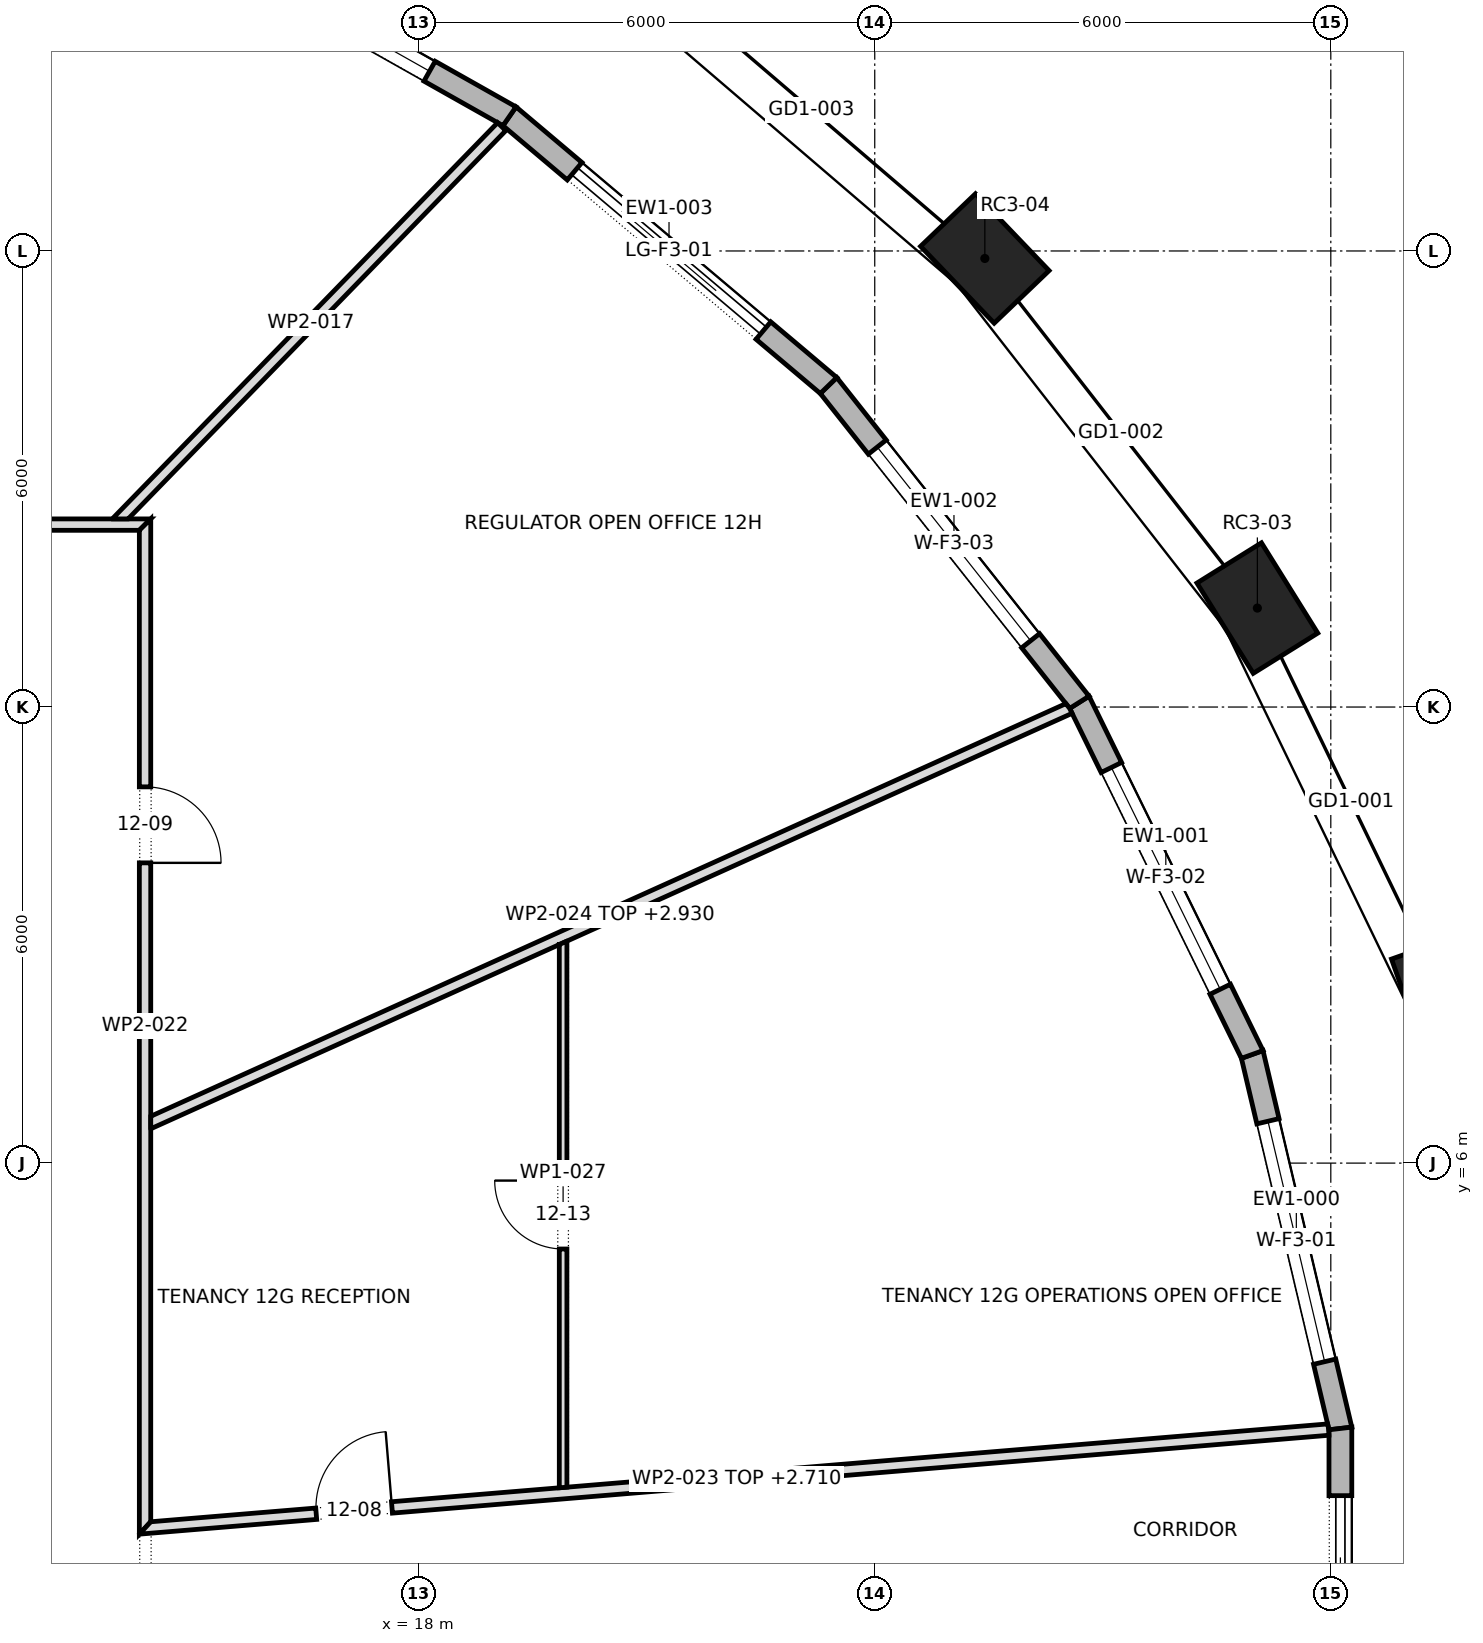
"""IFC4 building model, lengths in metres.
Left out: names, types, materials, properties, quantities, classifications, styles, units other than length and angle.
Written with IfcOpenShell. Run it as: python <this file> out.ifc"""

import sys

from ifc_helpers import new_model, si_unit, direction, frame, frame_2d, origin, origin_2d, place, context, subcontext, project, spatial, polyline, rectangle, outline, extrude, element, fill, save


model = new_model("IFC4")
c1 = context("Model", 3, precision=1e-05, world=origin(), true_north=direction((0.0, 1.0)))
c2 = subcontext(c1, "Body", "Model", "MODEL_VIEW")
j1 = project(units=[si_unit("LENGTHUNIT", "METRE"), si_unit("PLANEANGLEUNIT", "RADIAN")], contexts=[c1])
p1 = place(None, origin())
s1 = spatial("IfcSite", under=j1, at=p1, CompositionType="ELEMENT")
p2 = place(p1, origin())
s2 = spatial("IfcBuilding", under=s1, at=p2, CompositionType="ELEMENT")
p3 = place(p2, frame((0.0, 0.0, 178.9)))
s3 = spatial("IfcBuildingStorey", under=s2, at=p3, CompositionType="ELEMENT", Elevation=178.9)
for number, where, z_axis, x_axis in (
    (1, (31.503, 8.191, 0.0), (0.0, 0.0, 1.0), (-0.334, 0.943, 0.0)),
    (2, (29.034, 13.302, 0.0), (0.0, 0.0, 1.0), (-0.529, 0.849, 0.0)),
    (3, (25.448, 17.901, 0.0), (0.0, 0.0, 1.0), (-0.692, 0.722, 0.0)),
):
    element("IfcColumn", number, at=place(p3, frame(where, z_axis=z_axis, x_axis=x_axis)), inside=s3, PredefinedType="COLUMN", context=c2, shape_type="SweptSolid", body=[
        extrude(rectangle(XDim=1.4, YDim=1.0, at=origin_2d()), origin(), (0.0, 0.0, 1.0), 4.0),
    ])
p4 = place(p3, frame((30.126, 2.509, 0.0), z_axis=(0.0, 0.0, 1.0), x_axis=(-0.229434992017, 0.973323987395, 0.0)))
e4 = element("IfcWall", 4, at=p4, inside=s3, PredefinedType="STANDARD", context=c2, shape_type="SweptSolid", body=[
    extrude(outline(polyline([(-0.017, -0.15), (5.072, -0.15), (5.039, 0.15), (0.017, 0.15), (-0.017, -0.15)])), origin(), (0.0, 0.0, 1.0), 3.7),
])
p5 = place(p4, frame((0.903, 0.0, 0.6)))
e5 = element("IfcOpeningElement", 5, at=p5, cuts=e4, PredefinedType="OPENING", context=c2, shape_type="SweptSolid", body=[
    extrude(rectangle(XDim=3.25, YDim=2.65, at=frame_2d((1.625, 1.325))), frame((0.0, 0.162, 0.0), z_axis=(0.0, -1.0, 0.0), x_axis=(1.0, 0.0, 0.0)), (0.0, 0.0, 1.0), 0.324),
])
p6 = place(p3, frame((28.966, 7.429, 0.0), z_axis=(0.0, 0.0, 1.0), x_axis=(-0.440673883676, 0.897667270343, 0.0)))
e6 = element("IfcWall", 6, at=p6, inside=s3, PredefinedType="STANDARD", context=c2, shape_type="SweptSolid", body=[
    extrude(outline(polyline([(-0.017, -0.15), (5.177, -0.15), (5.145, 0.15), (0.017, 0.15), (-0.017, -0.15)])), origin(), (0.0, 0.0, 1.0), 3.7),
])
p7 = place(p6, frame((0.956, 0.0, 0.6)))
e7 = element("IfcOpeningElement", 7, at=p7, cuts=e6, PredefinedType="OPENING", context=c2, shape_type="SweptSolid", body=[
    extrude(rectangle(XDim=3.25, YDim=2.65, at=frame_2d((1.625, 1.325))), frame((0.0, 0.162, 0.0), z_axis=(0.0, -1.0, 0.0), x_axis=(1.0, 0.0, 0.0)), (0.0, 0.0, 1.0), 0.324),
])
p8 = place(p3, frame((26.692, 12.062, 0.0), z_axis=(0.0, 0.0, 1.0), x_axis=(-0.620766467446, 0.78399553117, 0.0)))
e8 = element("IfcWall", 8, at=p8, inside=s3, PredefinedType="STANDARD", context=c2, shape_type="SweptSolid", body=[
    extrude(outline(polyline([(-0.016, -0.15), (5.331, -0.15), (5.301, 0.15), (0.016, 0.15), (-0.016, -0.15)])), origin(), (0.0, 0.0, 1.0), 3.7),
])
p9 = place(p8, frame((1.033, 0.0, 0.6)))
e9 = element("IfcOpeningElement", 9, at=p9, cuts=e8, PredefinedType="OPENING", context=c2, shape_type="SweptSolid", body=[
    extrude(rectangle(XDim=3.25, YDim=2.65, at=frame_2d((1.625, 1.325))), frame((0.0, 0.162, 0.0), z_axis=(0.0, -1.0, 0.0), x_axis=(1.0, 0.0, 0.0)), (0.0, 0.0, 1.0), 0.324),
])
p10 = place(p3, frame((23.392, 16.23, 0.0), z_axis=(0.0, 0.0, 1.0), x_axis=(-0.764238764041, 0.64493341636, 0.0)))
e10 = element("IfcWall", 10, at=p10, inside=s3, PredefinedType="STANDARD", context=c2, shape_type="SweptSolid", body=[
    extrude(outline(polyline([(-0.015, -0.15), (5.507, -0.15), (5.478, 0.15), (0.015, 0.15), (-0.015, -0.15)])), origin(), (0.0, 0.0, 1.0), 3.7),
])
p11 = place(p10, frame((1.121, 0.0, 0.0)))
e11 = element("IfcOpeningElement", 11, at=p11, cuts=e10, PredefinedType="OPENING", context=c2, shape_type="SweptSolid", body=[
    extrude(rectangle(XDim=3.25, YDim=3.25, at=frame_2d((1.625, 1.625))), frame((0.0, 0.162, 0.0), z_axis=(0.0, -1.0, 0.0), x_axis=(1.0, 0.0, 0.0)), (0.0, 0.0, 1.0), 0.324),
])
p12 = place(p3, frame((19.195, 19.772, 0.0), z_axis=(0.0, 0.0, 1.0), x_axis=(-0.871077775545, 0.491145099691, 0.0)))
e12 = element("IfcWall", 12, at=p12, inside=s3, PredefinedType="STANDARD", context=c2, shape_type="SweptSolid", body=[
    extrude(outline(polyline([(-0.014, -0.15), (5.677, -0.15), (5.65, 0.15), (0.014, 0.15), (-0.014, -0.15)])), origin(), (0.0, 0.0, 1.0), 3.7),
])
p13 = place(p12, frame((1.207, 0.0, 0.6)))
e13 = element("IfcOpeningElement", 13, at=p13, cuts=e12, PredefinedType="OPENING", context=c2, shape_type="SweptSolid", body=[
    extrude(rectangle(XDim=3.25, YDim=2.65, at=frame_2d((1.625, 1.325))), frame((0.0, 0.162, 0.0), z_axis=(0.0, -1.0, 0.0), x_axis=(1.0, 0.0, 0.0)), (0.0, 0.0, 1.0), 0.324),
])
p14 = place(p3, frame((30.126, -2.509, 0.0), z_axis=(0.0, 0.0, 1.0), x_axis=(0.0, 1.0, 0.0)))
e14 = element("IfcWall", 14, at=p14, inside=s3, PredefinedType="STANDARD", context=c2, shape_type="SweptSolid", body=[
    extrude(outline(polyline([(-0.017, -0.15), (5.035, -0.15), (5.0, 0.15), (0.017, 0.15), (-0.017, -0.15)])), origin(), (0.0, 0.0, 1.0), 3.7),
])
p15 = place(p14, frame((0.884, 0.0, 0.0)))
e15 = element("IfcOpeningElement", 15, at=p15, cuts=e14, PredefinedType="OPENING", context=c2, shape_type="SweptSolid", body=[
    extrude(rectangle(XDim=3.25, YDim=3.25, at=frame_2d((1.625, 1.625))), frame((0.0, 0.162, 0.0), z_axis=(0.0, -1.0, 0.0), x_axis=(1.0, 0.0, 0.0)), (0.0, 0.0, 1.0), 0.324),
])
p16 = place(p3, frame((1.596, 14.4, 0.0), z_axis=(0.0, 0.0, 1.0), x_axis=(1.0, 0.0, 0.0)))
e16 = element("IfcWall", 16, at=p16, inside=s3, PredefinedType="PARTITIONING", context=c2, shape_type="SweptSolid", body=[
    extrude(outline(polyline([(0.0, -0.075), (1.818, -0.075), (3.637, -0.075), (5.455, -0.075), (7.274, -0.075), (9.092, -0.075), (10.911, -0.075), (12.729, -0.075), (12.879, 0.075), (11.063, 0.075), (9.248, 0.075), (7.432, 0.075), (5.616, 0.075), (3.8, 0.075), (1.984, 0.075), (0.168, 0.075), (0.0, -0.075), (0.0, -0.075)])), origin(), (0.0, 0.0, 1.0), 3.7),
])
p17 = place(p16, frame((5.744, 0.0, 0.0)))
e17 = element("IfcOpeningElement", 17, at=p17, cuts=e16, PredefinedType="OPENING", context=c2, shape_type="SweptSolid", body=[
    extrude(rectangle(XDim=1.0, YDim=2.1, at=frame_2d((0.5, 1.05))), frame((0.0, 0.087, 0.0), z_axis=(0.0, -1.0, 0.0), x_axis=(1.0, 0.0, 0.0)), (0.0, 0.0, 1.0), 0.174),
])
p18 = place(p3, frame((14.022, 14.423, 0.0), z_axis=(0.0, 0.0, 1.0), x_axis=(0.69721790069, 0.716859260216, 0.0)))
e18 = element("IfcWall", 18, at=p18, inside=s3, PredefinedType="PARTITIONING", context=c2, shape_type="SweptSolid", body=[
    extrude(outline(polyline([(0.0, 0.075), (0.0, 0.075), (0.146, -0.075), (1.927, -0.075), (3.708, -0.075), (5.49, -0.075), (7.271, -0.075), (7.271, 0.075), (5.454, 0.075), (3.636, 0.075), (1.818, 0.075), (0.0, 0.075)])), origin(), (0.0, 0.0, 1.0), 3.7),
])
p19 = place(p3, frame((14.4, 1.118, 0.0), z_axis=(0.0, 0.0, 1.0), x_axis=(0.0, 1.0, 0.0)))
e19 = element("IfcWall", 19, at=p19, inside=s3, PredefinedType="PARTITIONING", context=c2, shape_type="SweptSolid", body=[
    extrude(outline(polyline([(0.163, -0.075), (2.048, -0.075), (3.933, -0.075), (5.817, -0.075), (7.702, -0.075), (9.587, -0.075), (11.472, -0.075), (13.356, -0.075), (13.207, 0.075), (11.32, 0.075), (9.433, 0.075), (7.547, 0.075), (5.66, 0.075), (3.773, 0.075), (1.887, 0.075), (0.0, 0.075), (0.163, -0.075)])), origin(), (0.0, 0.0, 1.0), 3.7),
])
p20 = place(p19, frame((8.832, 0.0, 0.0)))
e20 = element("IfcOpeningElement", 20, at=p20, cuts=e19, PredefinedType="OPENING", context=c2, shape_type="SweptSolid", body=[
    extrude(rectangle(XDim=1.0, YDim=2.1, at=frame_2d((0.5, 1.05))), frame((0.0, 0.087, 0.0), z_axis=(0.0, -1.0, 0.0), x_axis=(1.0, 0.0, 0.0)), (0.0, 0.0, 1.0), 0.174),
])
p21 = place(p3, frame((14.319, 1.193, 0.0), z_axis=(0.0, 0.0, 1.0), x_axis=(0.996561500002, 0.082856361942, 0.0)))
e21 = element("IfcWall", 21, at=p21, inside=s3, PredefinedType="PARTITIONING", context=c2, shape_type="SweptSolid", body=[
    extrude(outline(polyline([(0.0, -0.075), (1.963, -0.075), (3.926, -0.075), (5.889, -0.075), (7.853, -0.075), (9.816, -0.075), (11.779, -0.075), (13.742, -0.075), (15.705, -0.075), (15.705, -0.074), (15.705, 0.036), (15.699, 0.075), (13.757, 0.075), (11.815, 0.075), (9.873, 0.075), (7.931, 0.075), (5.989, 0.075), (4.047, 0.075), (2.105, 0.075), (0.163, 0.075), (0.082, 0.0), (0.0, -0.075), (0.0, -0.075)])), origin(), (0.0, 0.0, 1.0), 2.71),
])
p22 = place(p21, frame((2.341, 0.0, 0.0)))
e22 = element("IfcOpeningElement", 22, at=p22, cuts=e21, PredefinedType="OPENING", context=c2, shape_type="SweptSolid", body=[
    extrude(rectangle(XDim=1.0, YDim=2.1, at=frame_2d((0.5, 1.05))), frame((0.0, 0.087, 0.0), z_axis=(0.0, -1.0, 0.0), x_axis=(1.0, 0.0, 0.0)), (0.0, 0.0, 1.0), 0.174),
])
p23 = place(p3, frame((14.445, 6.52, 0.0), z_axis=(0.0, 0.0, 1.0), x_axis=(0.911609963385, 0.411056291349, 0.0)))
e23 = element("IfcWall", 23, at=p23, inside=s3, PredefinedType="PARTITIONING", context=c2, shape_type="SweptSolid", body=[
    extrude(outline(polyline([(0.0, -0.075), (1.965, -0.075), (3.93, -0.075), (5.896, -0.075), (5.897, -0.073), (5.901, -0.075), (7.75, -0.075), (9.599, -0.075), (11.447, -0.075), (13.296, -0.075), (13.296, -0.069), (13.294, -0.003), (13.274, 0.075), (11.387, 0.075), (9.501, 0.075), (7.614, 0.075), (5.727, 0.075), (3.841, 0.075), (1.954, 0.075), (0.067, 0.075), (0.0, -0.074), (0.0, -0.075)])), origin(), (0.0, 0.0, 1.0), 2.93),
])
p24 = place(p3, frame((19.9, 8.92, 0.0), z_axis=(0.0, 0.0, 1.0), x_axis=(0.0, -1.0, 0.0)))
e24 = element("IfcWall", 24, at=p24, inside=s3, PredefinedType="PARTITIONING", context=c2, shape_type="SweptSolid", body=[
    extrude(outline(polyline([(7.191, -0.05), (7.191, -0.048), (7.183, 0.05), (5.387, 0.05), (3.592, 0.05), (1.796, 0.05), (0.0, 0.05), (0.0, 0.049), (0.045, -0.05), (1.832, -0.05), (3.618, -0.05), (5.405, -0.05), (7.191, -0.05)])), origin(), (0.0, 0.0, 1.0), 3.7),
])
p25 = place(p24, frame((3.15, 0.0, 0.0)))
e25 = element("IfcOpeningElement", 25, at=p25, cuts=e24, PredefinedType="OPENING", context=c2, shape_type="SweptSolid", body=[
    extrude(rectangle(XDim=0.9, YDim=2.1, at=frame_2d((0.45, 1.05))), frame((0.0, 0.062, 0.0), z_axis=(0.0, -1.0, 0.0), x_axis=(1.0, 0.0, 0.0)), (0.0, 0.0, 1.0), 0.124),
])
p26 = place(p5, origin())
e26 = element("IfcWindow", 26, at=p26, inside=s3, PartitioningType="TRIPLE_PANEL_VERTICAL", PredefinedType="WINDOW", context=c2, shape_type="SweptSolid", body=[
    extrude(rectangle(XDim=3.25, YDim=2.65, at=frame_2d((1.625, 1.325))), frame((0.0, 0.03, 0.0), z_axis=(0.0, -1.0, 0.0), x_axis=(1.0, 0.0, 0.0)), (0.0, 0.0, 1.0), 0.06),
])
fill(e5, e26)
p27 = place(p7, origin())
e27 = element("IfcWindow", 27, at=p27, inside=s3, PartitioningType="TRIPLE_PANEL_VERTICAL", PredefinedType="WINDOW", context=c2, shape_type="SweptSolid", body=[
    extrude(rectangle(XDim=3.25, YDim=2.65, at=frame_2d((1.625, 1.325))), frame((0.0, 0.03, 0.0), z_axis=(0.0, -1.0, 0.0), x_axis=(1.0, 0.0, 0.0)), (0.0, 0.0, 1.0), 0.06),
])
fill(e7, e27)
p28 = place(p9, origin())
e28 = element("IfcWindow", 28, at=p28, inside=s3, PartitioningType="TRIPLE_PANEL_VERTICAL", PredefinedType="WINDOW", context=c2, shape_type="SweptSolid", body=[
    extrude(rectangle(XDim=3.25, YDim=2.65, at=frame_2d((1.625, 1.325))), frame((0.0, 0.03, 0.0), z_axis=(0.0, -1.0, 0.0), x_axis=(1.0, 0.0, 0.0)), (0.0, 0.0, 1.0), 0.06),
])
fill(e9, e28)
p29 = place(p11, origin())
e29 = element("IfcDoor", 29, at=p29, inside=s3, OperationType="DOUBLE_DOOR_SLIDING", PredefinedType="DOOR", context=c2, shape_type="SweptSolid", body=[
    extrude(rectangle(XDim=3.25, YDim=3.25, at=frame_2d((1.625, 1.625))), frame((0.0, 0.025, 0.0), z_axis=(0.0, -1.0, 0.0), x_axis=(1.0, 0.0, 0.0)), (0.0, 0.0, 1.0), 0.05),
])
fill(e11, e29)
p30 = place(p13, origin())
e30 = element("IfcWindow", 30, at=p30, inside=s3, PartitioningType="TRIPLE_PANEL_VERTICAL", PredefinedType="WINDOW", context=c2, shape_type="SweptSolid", body=[
    extrude(rectangle(XDim=3.25, YDim=2.65, at=frame_2d((1.625, 1.325))), frame((0.0, 0.03, 0.0), z_axis=(0.0, -1.0, 0.0), x_axis=(1.0, 0.0, 0.0)), (0.0, 0.0, 1.0), 0.06),
])
fill(e13, e30)
p31 = place(p15, origin())
e31 = element("IfcDoor", 31, at=p31, inside=s3, OperationType="DOUBLE_DOOR_SLIDING", PredefinedType="DOOR", context=c2, shape_type="SweptSolid", body=[
    extrude(rectangle(XDim=3.25, YDim=3.25, at=frame_2d((1.625, 1.625))), frame((0.0, 0.025, 0.0), z_axis=(0.0, -1.0, 0.0), x_axis=(1.0, 0.0, 0.0)), (0.0, 0.0, 1.0), 0.05),
])
fill(e15, e31)
p32 = place(p22, origin())
e32 = element("IfcDoor", 32, at=p32, inside=s3, OperationType="SINGLE_SWING_LEFT", PredefinedType="DOOR", context=c2, shape_type="SweptSolid", body=[
    extrude(rectangle(XDim=1.0, YDim=2.1, at=frame_2d((0.5, 1.05))), frame((0.0, 0.025, 0.0), z_axis=(0.0, -1.0, 0.0), x_axis=(1.0, 0.0, 0.0)), (0.0, 0.0, 1.0), 0.05),
])
fill(e22, e32)
p33 = place(p20, frame((1.0, 0.0, 0.0), z_axis=(0.0, 0.0, 1.0), x_axis=(-1.0, 0.0, 0.0)))
e33 = element("IfcDoor", 33, at=p33, inside=s3, OperationType="SINGLE_SWING_LEFT", PredefinedType="DOOR", context=c2, shape_type="SweptSolid", body=[
    extrude(rectangle(XDim=1.0, YDim=2.1, at=frame_2d((0.5, 1.05))), frame((0.0, 0.025, 0.0), z_axis=(0.0, -1.0, 0.0), x_axis=(1.0, 0.0, 0.0)), (0.0, 0.0, 1.0), 0.05),
])
fill(e20, e33)
p34 = place(p25, frame((0.9, 0.0, 0.0), z_axis=(0.0, 0.0, 1.0), x_axis=(-1.0, 0.0, 0.0)))
e34 = element("IfcDoor", 34, at=p34, inside=s3, OperationType="SINGLE_SWING_LEFT", PredefinedType="DOOR", context=c2, shape_type="SweptSolid", body=[
    extrude(rectangle(XDim=0.9, YDim=2.1, at=frame_2d((0.45, 1.05))), frame((0.0, 0.025, 0.0), z_axis=(0.0, -1.0, 0.0), x_axis=(1.0, 0.0, 0.0)), (0.0, 0.0, 1.0), 0.05),
])
fill(e25, e34)
save(model, sys.argv[1])
